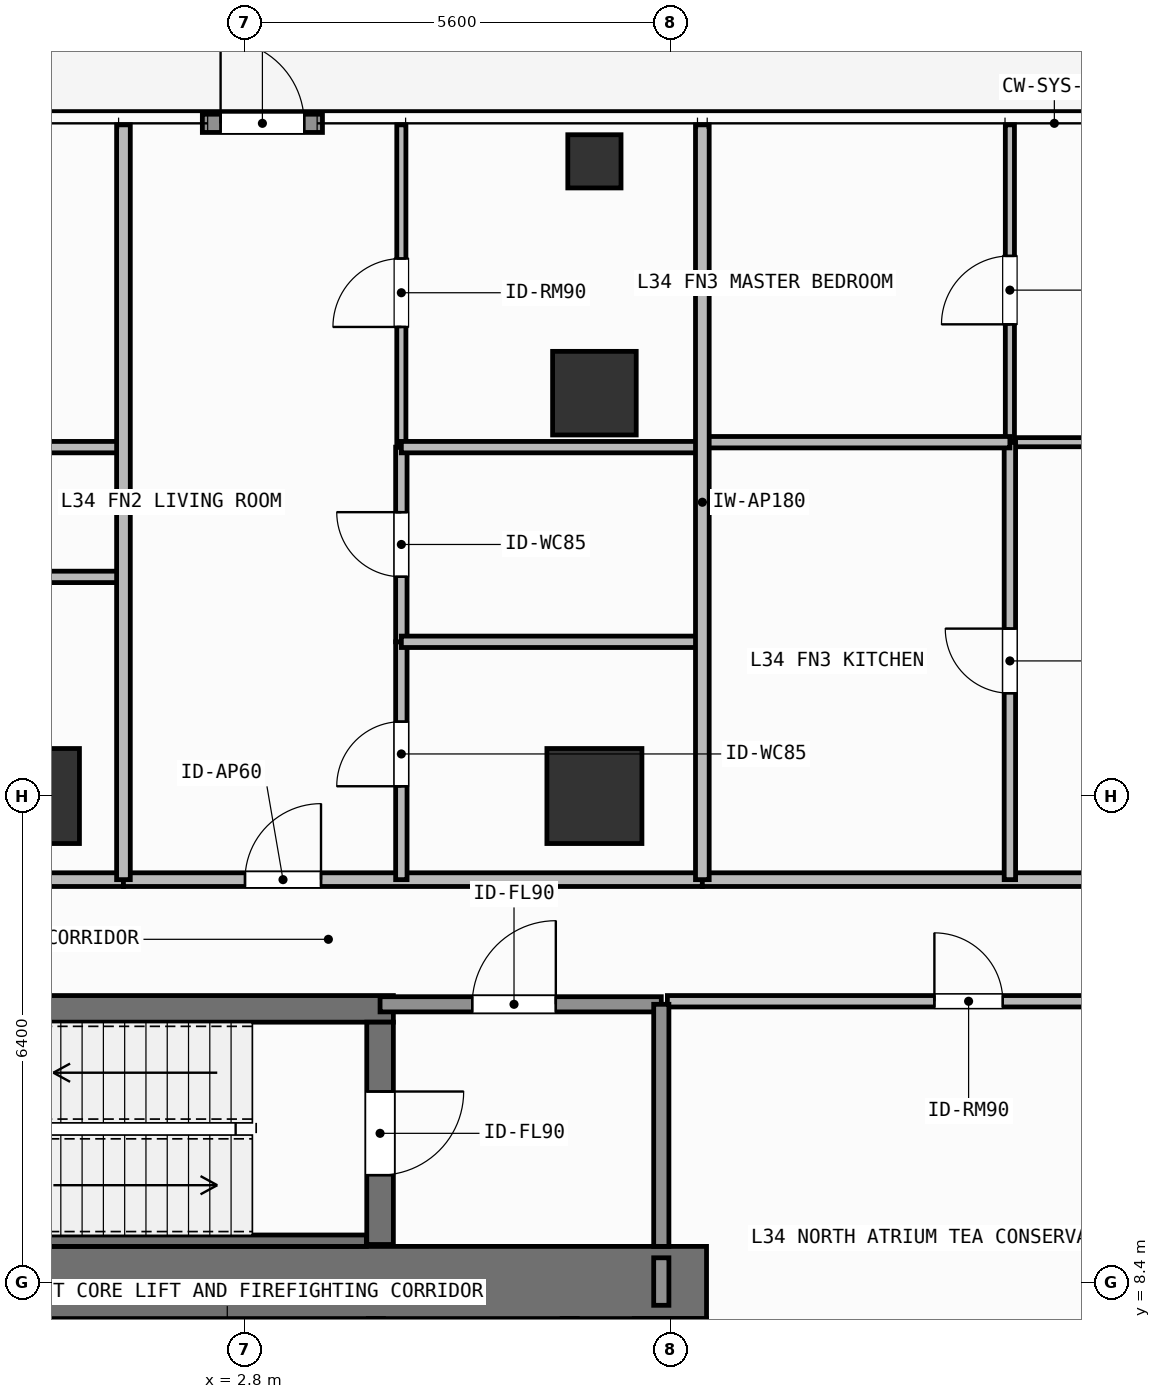
"""IFC4 building model, lengths in metres.
Left out: names, types, materials, properties, quantities, classifications, styles, units other than length and angle.
Written with IfcOpenShell. Run it as: python <this file> out.ifc"""

import sys

from ifc_helpers import new_model, si_unit, direction, frame, frame_2d, origin, origin_2d, place, context, subcontext, project, spatial, rectangle, hollow_rectangle, extrude, element, fill, save


model = new_model("IFC4")
c1 = context("Model", 3, precision=1e-05, world=origin(), true_north=direction((0.0, 1.0)))
c2 = subcontext(c1, "Body", "Model", "MODEL_VIEW")
j1 = project(units=[si_unit("LENGTHUNIT", "METRE"), si_unit("PLANEANGLEUNIT", "RADIAN")], contexts=[c1])
p1 = place(None, origin())
s1 = spatial("IfcSite", under=j1, at=p1, CompositionType="ELEMENT")
p2 = place(p1, origin())
s2 = spatial("IfcBuilding", under=s1, at=p2, CompositionType="ELEMENT")
p3 = place(p2, frame((0.0, 0.0, 136.8)))
s3 = spatial("IfcBuildingStorey", under=s2, at=p3, CompositionType="ELEMENT", Elevation=136.8)
p4 = place(p3, frame((-7.55, 8.4, 0.0), z_axis=(0.0, 0.0, 1.0), x_axis=(1.0, 0.0, 0.0)))
e1 = element("IfcWall", 1, at=p4, inside=s3, PredefinedType="SHEAR", context=c2, shape_type="SweptSolid", body=[
    extrude(rectangle(XDim=16.425, YDim=0.95, at=frame_2d((8.212, 0.0))), origin(), (0.0, 0.0, 1.0), 3.9),
])
p5 = place(p3, frame((8.4, 5.825, 0.0), z_axis=(0.0, 0.0, 1.0), x_axis=(0.0, 1.0, 0.0)))
e2 = element("IfcWall", 2, at=p5, inside=s3, PredefinedType="SHEAR", context=c2, shape_type="SweptSolid", body=[
    extrude(rectangle(XDim=2.1, YDim=0.95, at=frame_2d((1.05, 0.0))), origin(), (0.0, 0.0, 1.0), 3.9),
])
p6 = place(p3, frame((-2.555, 12.0, 0.0), z_axis=(0.0, 0.0, 1.0), x_axis=(1.0, 0.0, 0.0)))
e3 = element("IfcWall", 3, at=p6, inside=s3, PredefinedType="SHEAR", context=c2, shape_type="SweptSolid", body=[
    extrude(rectangle(XDim=7.31, YDim=0.35, at=frame_2d((3.655, 0.0))), origin(), (0.0, 0.0, 1.0), 3.9),
])
p7 = place(p3, frame((-2.2, 8.95, 0.0), z_axis=(0.0, 0.0, 1.0), x_axis=(1.0, 0.0, 0.0)))
e4 = element("IfcWall", 4, at=p7, inside=s3, PredefinedType="SHEAR", context=c2, shape_type="SweptSolid", body=[
    extrude(rectangle(XDim=6.6, YDim=0.15, at=frame_2d((3.3, 0.0))), origin(), (0.0, 0.0, 1.0), 3.9),
])
p8 = place(p3, frame((4.58, 11.825, 0.0), z_axis=(0.0, 0.0, 1.0), x_axis=(0.0, -1.0, 0.0)))
e5 = element("IfcWall", 5, at=p8, inside=s3, PredefinedType="SHEAR", context=c2, shape_type="SweptSolid", body=[
    extrude(rectangle(XDim=2.925, YDim=0.35, at=frame_2d((1.462, 0.0))), origin(), (0.0, 0.0, 1.0), 3.9),
])
p9 = place(p8, frame((0.913, 0.0, 0.0)))
e6 = element("IfcOpeningElement", 6, at=p9, cuts=e5, PredefinedType="OPENING", context=c2, shape_type="SweptSolid", body=[
    extrude(rectangle(XDim=1.1, YDim=2.15, at=frame_2d((0.55, 1.075))), frame((0.0, 0.185, 0.0), z_axis=(0.0, -1.0, 0.0), x_axis=(1.0, 0.0, 0.0)), (0.0, 0.0, 1.0), 0.37),
])
for number, where, z_axis, x_axis in (
    (7, (0.0, 14.8, 0.0), (0.0, 0.0, 1.0), (1.0, 0.0, 0.0)),
    (8, (7.4, 14.8, 0.0), (0.0, 0.0, 1.0), (1.0, 0.0, 0.0)),
):
    element("IfcColumn", number, at=place(p3, frame(where, z_axis=z_axis, x_axis=x_axis)), inside=s3, PredefinedType="COLUMN", context=c2, shape_type="SweptSolid", body=[
        extrude(rectangle(XDim=1.25, YDim=1.25, at=origin_2d()), origin(), (0.0, 0.0, 1.0), 3.9),
    ])
p10 = place(p3, frame((7.4, 20.1, 0.0), z_axis=(0.0, 0.0, 1.0), x_axis=(1.0, 0.0, 0.0)))
e9 = element("IfcColumn", 9, at=p10, inside=s3, PredefinedType="COLUMN", context=c2, shape_type="SweptSolid", body=[
    extrude(rectangle(XDim=1.1, YDim=1.1, at=origin_2d()), origin(), (0.0, 0.0, 1.0), 3.9),
])
p11 = place(p3, frame((7.4, 23.15, 0.0), z_axis=(0.0, 0.0, 1.0), x_axis=(1.0, 0.0, 0.0)))
e10 = element("IfcColumn", 10, at=p11, inside=s3, PredefinedType="COLUMN", context=c2, shape_type="SweptSolid", body=[
    extrude(hollow_rectangle(XDim=0.7, YDim=0.7, WallThickness=0.032, at=origin_2d()), origin(), (0.0, 0.0, 1.0), 3.9),
])
p12 = place(p3, frame((2.242, 23.65, 0.0), z_axis=(0.0, 0.0, 1.0), x_axis=(1.0, 0.0, 0.0)))
e11 = element("IfcWall", 11, at=p12, inside=s3, PredefinedType="SOLIDWALL", context=c2, shape_type="SweptSolid", body=[
    extrude(rectangle(XDim=1.58, YDim=0.24, at=frame_2d((0.79, 0.0))), origin(), (0.0, 0.0, 1.0), 3.68),
])
p13 = place(p12, frame((0.24, 0.0, 0.0)))
e12 = element("IfcOpeningElement", 12, at=p13, cuts=e11, PredefinedType="OPENING", context=c2, shape_type="SweptSolid", body=[
    extrude(rectangle(XDim=1.1, YDim=2.2, at=frame_2d((0.55, 1.1))), frame((0.0, 0.13, 0.0), z_axis=(0.0, -1.0, 0.0), x_axis=(1.0, 0.0, 0.0)), (0.0, 0.0, 1.0), 0.26),
])
p14 = place(p3, frame((4.525, 5.825, 0.0), z_axis=(0.0, 0.0, 1.0), x_axis=(0.0, 1.0, 0.0)))
e13 = element("IfcWall", 13, at=p14, inside=s3, PredefinedType="SHEAR", context=c2, shape_type="SweptSolid", body=[
    extrude(rectangle(XDim=2.1, YDim=0.2, at=frame_2d((1.05, 0.0))), origin(), (0.0, 0.0, 1.0), 3.68),
])
p15 = place(p14, frame((0.425, 0.0, 0.0)))
e14 = element("IfcOpeningElement", 14, at=p15, cuts=e13, PredefinedType="OPENING", context=c2, shape_type="SweptSolid", body=[
    extrude(rectangle(XDim=1.1, YDim=2.2, at=frame_2d((0.55, 1.1))), frame((0.0, 0.11, 0.0), z_axis=(0.0, -1.0, 0.0), x_axis=(1.0, 0.0, 0.0)), (0.0, 0.0, 1.0), 0.22),
])
p16 = place(p3, frame((7.075, 5.825, 0.0), z_axis=(0.0, 0.0, 1.0), x_axis=(0.0, 1.0, 0.0)))
e15 = element("IfcWall", 15, at=p16, inside=s3, PredefinedType="SHEAR", context=c2, shape_type="SweptSolid", body=[
    extrude(rectangle(XDim=2.1, YDim=0.2, at=frame_2d((1.05, 0.0))), origin(), (0.0, 0.0, 1.0), 3.68),
])
p17 = place(p3, frame((4.58, 12.06, 0.0), z_axis=(0.0, 0.0, 1.0), x_axis=(1.0, 0.0, 0.0)))
e16 = element("IfcWall", 16, at=p17, inside=s3, PredefinedType="SOLIDWALL", context=c2, shape_type="SweptSolid", body=[
    extrude(rectangle(XDim=3.7, YDim=0.2, at=frame_2d((1.85, 0.0))), origin(), (0.0, 0.0, 1.0), 3.68),
])
p18 = place(p17, frame((1.212, 0.0, 0.0)))
e17 = element("IfcOpeningElement", 17, at=p18, cuts=e16, PredefinedType="OPENING", context=c2, shape_type="SweptSolid", body=[
    extrude(rectangle(XDim=1.1, YDim=2.15, at=frame_2d((0.55, 1.075))), frame((0.0, 0.11, 0.0), z_axis=(0.0, -1.0, 0.0), x_axis=(1.0, 0.0, 0.0)), (0.0, 0.0, 1.0), 0.22),
])
p19 = place(p3, frame((8.36, 12.1, 0.0), z_axis=(0.0, 0.0, 1.0), x_axis=(1.0, 0.0, 0.0)))
e18 = element("IfcWall", 18, at=p19, inside=s3, PredefinedType="PARTITIONING", context=c2, shape_type="SweptSolid", body=[
    extrude(rectangle(XDim=7.22, YDim=0.15, at=frame_2d((3.61, 0.0))), origin(), (0.0, 0.0, 1.0), 3.68),
])
p20 = place(p19, frame((3.513, 0.0, 0.0)))
e19 = element("IfcOpeningElement", 19, at=p20, cuts=e18, PredefinedType="OPENING", context=c2, shape_type="SweptSolid", body=[
    extrude(rectangle(XDim=0.9, YDim=2.1, at=frame_2d((0.45, 1.05))), frame((0.0, 0.085, 0.0), z_axis=(0.0, -1.0, 0.0), x_axis=(1.0, 0.0, 0.0)), (0.0, 0.0, 1.0), 0.17),
])
p21 = place(p3, frame((-16.32, 13.7, 0.0), z_axis=(0.0, 0.0, 1.0), x_axis=(1.0, 0.0, 0.0)))
e20 = element("IfcWall", 20, at=p21, inside=s3, PredefinedType="PARTITIONING", context=c2, shape_type="SweptSolid", body=[
    extrude(rectangle(XDim=17.524, YDim=0.18, at=frame_2d((8.762, 0.0))), origin(), (0.0, 0.0, 1.0), 3.68),
])
p22 = place(p21, frame((7.104, 0.0, 0.0)))
e21 = element("IfcOpeningElement", 21, at=p22, cuts=e20, PredefinedType="OPENING", context=c2, shape_type="SweptSolid", body=[
    extrude(rectangle(XDim=1.0, YDim=2.2, at=frame_2d((0.5, 1.1))), frame((0.0, 0.1, 0.0), z_axis=(0.0, -1.0, 0.0), x_axis=(1.0, 0.0, 0.0)), (0.0, 0.0, 1.0), 0.2),
])
p23 = place(p3, frame((1.204, 13.7, 0.0), z_axis=(0.0, 0.0, 1.0), x_axis=(1.0, 0.0, 0.0)))
e22 = element("IfcWall", 22, at=p23, inside=s3, PredefinedType="PARTITIONING", context=c2, shape_type="SweptSolid", body=[
    extrude(rectangle(XDim=7.616, YDim=0.18, at=frame_2d((3.808, 0.0))), origin(), (0.0, 0.0, 1.0), 3.68),
])
p24 = place(p23, frame((1.599, 0.0, 0.0)))
e23 = element("IfcOpeningElement", 23, at=p24, cuts=e22, PredefinedType="OPENING", context=c2, shape_type="SweptSolid", body=[
    extrude(rectangle(XDim=1.0, YDim=2.2, at=frame_2d((0.5, 1.1))), frame((0.0, 0.1, 0.0), z_axis=(0.0, -1.0, 0.0), x_axis=(1.0, 0.0, 0.0)), (0.0, 0.0, 1.0), 0.2),
])
p25 = place(p3, frame((4.86, 13.7, 0.0), z_axis=(0.0, 0.0, 1.0), x_axis=(0.0, 1.0, 0.0)))
e24 = element("IfcWall", 24, at=p25, inside=s3, PredefinedType="PARTITIONING", context=c2, shape_type="SweptSolid", body=[
    extrude(rectangle(XDim=3.129, YDim=0.15, at=frame_2d((1.564, 0.0))), origin(), (0.0, 0.0, 1.0), 3.68),
])
p26 = place(p25, frame((1.229, 0.0, 0.0)))
e25 = element("IfcOpeningElement", 25, at=p26, cuts=e24, PredefinedType="OPENING", context=c2, shape_type="SweptSolid", body=[
    extrude(rectangle(XDim=0.85, YDim=2.1, at=frame_2d((0.425, 1.05))), frame((0.0, 0.085, 0.0), z_axis=(0.0, -1.0, 0.0), x_axis=(1.0, 0.0, 0.0)), (0.0, 0.0, 1.0), 0.17),
])
p27 = place(p3, frame((4.86, 16.829, 0.0), z_axis=(0.0, 0.0, 1.0), x_axis=(0.0, 1.0, 0.0)))
e26 = element("IfcWall", 26, at=p27, inside=s3, PredefinedType="PARTITIONING", context=c2, shape_type="SweptSolid", body=[
    extrude(rectangle(XDim=2.561, YDim=0.15, at=frame_2d((1.28, 0.0))), origin(), (0.0, 0.0, 1.0), 3.68),
])
p28 = place(p27, frame((0.855, 0.0, 0.0)))
e27 = element("IfcOpeningElement", 27, at=p28, cuts=e26, PredefinedType="OPENING", context=c2, shape_type="SweptSolid", body=[
    extrude(rectangle(XDim=0.85, YDim=2.1, at=frame_2d((0.425, 1.05))), frame((0.0, 0.085, 0.0), z_axis=(0.0, -1.0, 0.0), x_axis=(1.0, 0.0, 0.0)), (0.0, 0.0, 1.0), 0.17),
])
p29 = place(p3, frame((4.86, 19.39, 0.0), z_axis=(0.0, 0.0, 1.0), x_axis=(0.0, 1.0, 0.0)))
e28 = element("IfcWall", 28, at=p29, inside=s3, PredefinedType="PARTITIONING", context=c2, shape_type="SweptSolid", body=[
    extrude(rectangle(XDim=4.24, YDim=0.12, at=frame_2d((2.12, 0.0))), origin(), (0.0, 0.0, 1.0), 3.68),
])
p30 = place(p29, frame((1.581, 0.0, 0.0)))
e29 = element("IfcOpeningElement", 29, at=p30, cuts=e28, PredefinedType="OPENING", context=c2, shape_type="SweptSolid", body=[
    extrude(rectangle(XDim=0.9, YDim=2.1, at=frame_2d((0.45, 1.05))), frame((0.0, 0.07, 0.0), z_axis=(0.0, -1.0, 0.0), x_axis=(1.0, 0.0, 0.0)), (0.0, 0.0, 1.0), 0.14),
])
p31 = place(p3, frame((8.82, 13.7, 0.0), z_axis=(0.0, 0.0, 1.0), x_axis=(1.0, 0.0, 0.0)))
e30 = element("IfcWall", 30, at=p31, inside=s3, PredefinedType="PARTITIONING", context=c2, shape_type="SweptSolid", body=[
    extrude(rectangle(XDim=15.3, YDim=0.18, at=frame_2d((7.65, 0.0))), origin(), (0.0, 0.0, 1.0), 3.68),
])
p32 = place(p31, frame((7.688, 0.0, 0.0)))
e31 = element("IfcOpeningElement", 31, at=p32, cuts=e30, PredefinedType="OPENING", context=c2, shape_type="SweptSolid", body=[
    extrude(rectangle(XDim=1.0, YDim=2.2, at=frame_2d((0.5, 1.1))), frame((0.0, 0.1, 0.0), z_axis=(0.0, -1.0, 0.0), x_axis=(1.0, 0.0, 0.0)), (0.0, 0.0, 1.0), 0.2),
])
p33 = place(p3, frame((12.866, 19.455, 0.0), z_axis=(0.0, 0.0, 1.0), x_axis=(1.0, 0.0, 0.0)))
e32 = element("IfcWall", 32, at=p33, inside=s3, PredefinedType="PARTITIONING", context=c2, shape_type="SweptSolid", body=[
    extrude(rectangle(XDim=8.404, YDim=0.12, at=frame_2d((4.202, 0.0))), origin(), (0.0, 0.0, 1.0), 3.68),
])
p34 = place(p33, frame((3.752, 0.0, 0.0)))
e33 = element("IfcOpeningElement", 33, at=p34, cuts=e32, PredefinedType="OPENING", context=c2, shape_type="SweptSolid", body=[
    extrude(rectangle(XDim=0.9, YDim=2.1, at=frame_2d((0.45, 1.05))), frame((0.0, 0.07, 0.0), z_axis=(0.0, -1.0, 0.0), x_axis=(1.0, 0.0, 0.0)), (0.0, 0.0, 1.0), 0.14),
])
p35 = place(p3, frame((12.866, 13.7, 0.0), z_axis=(0.0, 0.0, 1.0), x_axis=(0.0, 1.0, 0.0)))
e34 = element("IfcWall", 34, at=p35, inside=s3, PredefinedType="PARTITIONING", context=c2, shape_type="SweptSolid", body=[
    extrude(rectangle(XDim=5.755, YDim=0.15, at=frame_2d((2.877, 0.0))), origin(), (0.0, 0.0, 1.0), 3.68),
])
p36 = place(p35, frame((2.452, 0.0, 0.0)))
e35 = element("IfcOpeningElement", 35, at=p36, cuts=e34, PredefinedType="OPENING", context=c2, shape_type="SweptSolid", body=[
    extrude(rectangle(XDim=0.85, YDim=2.1, at=frame_2d((0.425, 1.05))), frame((0.0, 0.085, 0.0), z_axis=(0.0, -1.0, 0.0), x_axis=(1.0, 0.0, 0.0)), (0.0, 0.0, 1.0), 0.17),
])
p37 = place(p3, frame((12.866, 19.455, 0.0), z_axis=(0.0, 0.0, 1.0), x_axis=(0.0, 1.0, 0.0)))
e36 = element("IfcWall", 36, at=p37, inside=s3, PredefinedType="PARTITIONING", context=c2, shape_type="SweptSolid", body=[
    extrude(rectangle(XDim=4.175, YDim=0.12, at=frame_2d((2.087, 0.0))), origin(), (0.0, 0.0, 1.0), 3.68),
])
p38 = place(p37, frame((1.551, 0.0, 0.0)))
e37 = element("IfcOpeningElement", 37, at=p38, cuts=e36, PredefinedType="OPENING", context=c2, shape_type="SweptSolid", body=[
    extrude(rectangle(XDim=0.9, YDim=2.1, at=frame_2d((0.45, 1.05))), frame((0.0, 0.07, 0.0), z_axis=(0.0, -1.0, 0.0), x_axis=(1.0, 0.0, 0.0)), (0.0, 0.0, 1.0), 0.14),
])
p39 = place(p3, frame((8.28, 8.875, 0.0), z_axis=(0.0, 0.0, 1.0), x_axis=(0.0, 1.0, 0.0)))
e38 = element("IfcWall", 38, at=p39, inside=s3, PredefinedType="SOLIDWALL", context=c2, shape_type="SweptSolid", body=[
    extrude(rectangle(XDim=3.185, YDim=0.2, at=frame_2d((1.593, 0.0))), origin(), (0.0, 0.0, 1.0), 3.68),
])
p40 = place(p3, frame((8.28, 8.1, 0.0), z_axis=(0.0, 0.0, 1.0), x_axis=(0.0, 1.0, 0.0)))
e39 = element("IfcWall", 39, at=p40, inside=s3, PredefinedType="SOLIDWALL", context=c2, shape_type="SweptSolid", body=[
    extrude(rectangle(XDim=0.625, YDim=0.2, at=frame_2d((0.312, 0.0))), origin(), (0.0, 0.0, 1.0), 3.68),
])
for number, where, z_axis, x_axis in (
    (40, (-4.89, 17.683, 0.0), (0.0, 0.0, 1.0), (1.0, 0.0, 0.0)),
    (41, (-4.89, 19.39, 0.0), (0.0, 0.0, 1.0), (1.0, 0.0, 0.0)),
):
    element("IfcWall", number, at=place(p3, frame(where, z_axis=z_axis, x_axis=x_axis)), inside=s3, PredefinedType="PARTITIONING", context=c2, shape_type="SweptSolid", body=[
        extrude(rectangle(XDim=6.094, YDim=0.15, at=frame_2d((3.047, 0.0))), origin(), (0.0, 0.0, 1.0), 3.68),
    ])
for number, where, z_axis, x_axis in (
    (42, (4.86, 16.829, 0.0), (0.0, 0.0, 1.0), (1.0, 0.0, 0.0)),
    (43, (4.86, 19.39, 0.0), (0.0, 0.0, 1.0), (1.0, 0.0, 0.0)),
):
    element("IfcWall", number, at=place(p3, frame(where, z_axis=z_axis, x_axis=x_axis)), inside=s3, PredefinedType="PARTITIONING", context=c2, shape_type="SweptSolid", body=[
        extrude(rectangle(XDim=3.96, YDim=0.15, at=frame_2d((1.98, 0.0))), origin(), (0.0, 0.0, 1.0), 3.68),
    ])
p41 = place(p3, frame((1.204, 13.7, 0.0), z_axis=(0.0, 0.0, 1.0), x_axis=(0.0, 1.0, 0.0)))
e44 = element("IfcWall", 44, at=p41, inside=s3, PredefinedType="PARTITIONING", context=c2, shape_type="SweptSolid", body=[
    extrude(rectangle(XDim=9.93, YDim=0.18, at=frame_2d((4.965, 0.0))), origin(), (0.0, 0.0, 1.0), 3.68),
])
p42 = place(p3, frame((8.82, 19.455, 0.0), z_axis=(0.0, 0.0, 1.0), x_axis=(1.0, 0.0, 0.0)))
e45 = element("IfcWall", 45, at=p42, inside=s3, PredefinedType="PARTITIONING", context=c2, shape_type="SweptSolid", body=[
    extrude(rectangle(XDim=4.046, YDim=0.15, at=frame_2d((2.023, 0.0))), origin(), (0.0, 0.0, 1.0), 3.68),
])
p43 = place(p3, frame((8.82, 13.7, 0.0), z_axis=(0.0, 0.0, 1.0), x_axis=(0.0, 1.0, 0.0)))
e46 = element("IfcWall", 46, at=p43, inside=s3, PredefinedType="PARTITIONING", context=c2, shape_type="SweptSolid", body=[
    extrude(rectangle(XDim=9.93, YDim=0.18, at=frame_2d((4.965, 0.0))), origin(), (0.0, 0.0, 1.0), 3.68),
])
p44 = place(p13, origin())
e47 = element("IfcDoor", 47, at=p44, inside=s3, OperationType="SINGLE_SWING_LEFT", PredefinedType="DOOR", context=c2, shape_type="SweptSolid", body=[
    extrude(rectangle(XDim=1.1, YDim=2.2, at=frame_2d((0.55, 1.1))), frame((0.0, 0.025, 0.0), z_axis=(0.0, -1.0, 0.0), x_axis=(1.0, 0.0, 0.0)), (0.0, 0.0, 1.0), 0.05),
])
fill(e12, e47)
p45 = place(p9, origin())
e48 = element("IfcDoor", 48, at=p45, inside=s3, OperationType="SINGLE_SWING_LEFT", PredefinedType="DOOR", context=c2, shape_type="SweptSolid", body=[
    extrude(rectangle(XDim=1.1, YDim=2.15, at=frame_2d((0.55, 1.075))), frame((0.0, 0.025, 0.0), z_axis=(0.0, -1.0, 0.0), x_axis=(1.0, 0.0, 0.0)), (0.0, 0.0, 1.0), 0.05),
])
fill(e6, e48)
p46 = place(p18, origin())
e49 = element("IfcDoor", 49, at=p46, inside=s3, OperationType="SINGLE_SWING_RIGHT", PredefinedType="DOOR", context=c2, shape_type="SweptSolid", body=[
    extrude(rectangle(XDim=1.1, YDim=2.15, at=frame_2d((0.55, 1.075))), frame((0.0, 0.025, 0.0), z_axis=(0.0, -1.0, 0.0), x_axis=(1.0, 0.0, 0.0)), (0.0, 0.0, 1.0), 0.05),
])
fill(e17, e49)
p47 = place(p20, origin())
e50 = element("IfcDoor", 50, at=p47, inside=s3, OperationType="SINGLE_SWING_LEFT", PredefinedType="DOOR", context=c2, shape_type="SweptSolid", body=[
    extrude(rectangle(XDim=0.9, YDim=2.1, at=frame_2d((0.45, 1.05))), frame((0.0, 0.025, 0.0), z_axis=(0.0, -1.0, 0.0), x_axis=(1.0, 0.0, 0.0)), (0.0, 0.0, 1.0), 0.05),
])
fill(e19, e50)
p48 = place(p24, origin())
e51 = element("IfcDoor", 51, at=p48, inside=s3, OperationType="SINGLE_SWING_RIGHT", PredefinedType="DOOR", context=c2, shape_type="SweptSolid", body=[
    extrude(rectangle(XDim=1.0, YDim=2.2, at=frame_2d((0.5, 1.1))), frame((0.0, 0.025, 0.0), z_axis=(0.0, -1.0, 0.0), x_axis=(1.0, 0.0, 0.0)), (0.0, 0.0, 1.0), 0.05),
])
fill(e23, e51)
p49 = place(p26, origin())
e52 = element("IfcDoor", 52, at=p49, inside=s3, OperationType="SINGLE_SWING_LEFT", PredefinedType="DOOR", context=c2, shape_type="SweptSolid", body=[
    extrude(rectangle(XDim=0.85, YDim=2.1, at=frame_2d((0.425, 1.05))), frame((0.0, 0.025, 0.0), z_axis=(0.0, -1.0, 0.0), x_axis=(1.0, 0.0, 0.0)), (0.0, 0.0, 1.0), 0.05),
])
fill(e25, e52)
p50 = place(p28, origin())
e53 = element("IfcDoor", 53, at=p50, inside=s3, OperationType="SINGLE_SWING_RIGHT", PredefinedType="DOOR", context=c2, shape_type="SweptSolid", body=[
    extrude(rectangle(XDim=0.85, YDim=2.1, at=frame_2d((0.425, 1.05))), frame((0.0, 0.025, 0.0), z_axis=(0.0, -1.0, 0.0), x_axis=(1.0, 0.0, 0.0)), (0.0, 0.0, 1.0), 0.05),
])
fill(e27, e53)
p51 = place(p30, origin())
e54 = element("IfcDoor", 54, at=p51, inside=s3, OperationType="SINGLE_SWING_LEFT", PredefinedType="DOOR", context=c2, shape_type="SweptSolid", body=[
    extrude(rectangle(XDim=0.9, YDim=2.1, at=frame_2d((0.45, 1.05))), frame((0.0, 0.025, 0.0), z_axis=(0.0, -1.0, 0.0), x_axis=(1.0, 0.0, 0.0)), (0.0, 0.0, 1.0), 0.05),
])
fill(e29, e54)
p52 = place(p36, origin())
e55 = element("IfcDoor", 55, at=p52, inside=s3, OperationType="SINGLE_SWING_RIGHT", PredefinedType="DOOR", context=c2, shape_type="SweptSolid", body=[
    extrude(rectangle(XDim=0.85, YDim=2.1, at=frame_2d((0.425, 1.05))), frame((0.0, 0.025, 0.0), z_axis=(0.0, -1.0, 0.0), x_axis=(1.0, 0.0, 0.0)), (0.0, 0.0, 1.0), 0.05),
])
fill(e35, e55)
p53 = place(p38, origin())
e56 = element("IfcDoor", 56, at=p53, inside=s3, OperationType="SINGLE_SWING_LEFT", PredefinedType="DOOR", context=c2, shape_type="SweptSolid", body=[
    extrude(rectangle(XDim=0.9, YDim=2.1, at=frame_2d((0.45, 1.05))), frame((0.0, 0.025, 0.0), z_axis=(0.0, -1.0, 0.0), x_axis=(1.0, 0.0, 0.0)), (0.0, 0.0, 1.0), 0.05),
])
fill(e37, e56)
save(model, sys.argv[1])
